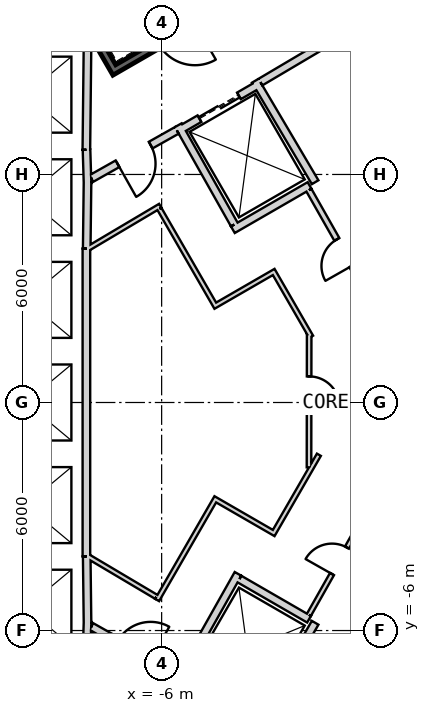
"""IFC4 building model, lengths in metres.
Left out: names, types, materials, properties, quantities, classifications, styles, units other than length and angle.
Written with IfcOpenShell. Run it as: python <this file> out.ifc"""

import sys

from ifc_helpers import new_model, si_unit, direction, frame, frame_2d, origin, place, context, subcontext, project, spatial, rectangle, extrude, element, fill, save


model = new_model("IFC4")
c1 = context("Model", 3, precision=1e-05, world=origin(), true_north=direction((0.0, 1.0)))
c2 = subcontext(c1, "Body", "Model", "MODEL_VIEW")
j1 = project(units=[si_unit("LENGTHUNIT", "METRE"), si_unit("PLANEANGLEUNIT", "RADIAN")], contexts=[c1])
p1 = place(None, origin())
s1 = spatial("IfcSite", under=j1, at=p1, CompositionType="ELEMENT")
p2 = place(p1, origin())
s2 = spatial("IfcBuilding", under=s1, at=p2, CompositionType="ELEMENT")
p3 = place(p2, frame((0.0, 0.0, 253.2)))
s3 = spatial("IfcBuildingStorey", under=s2, at=p3, CompositionType="ELEMENT", Elevation=253.2)
p4 = place(p3, frame((19.475, 2.208, 0.0), z_axis=(0.0, 0.0, 1.0), x_axis=(-0.866028369851, 0.499994862586, 0.0)))
e1 = element("IfcWall", 1, at=p4, inside=s3, PredefinedType="SHEAR", context=c2, shape_type="SweptSolid", body=[
    extrude(rectangle(XDim=31.523, YDim=0.9, at=frame_2d((15.762, 0.0))), origin(), (0.0, 0.0, 1.0), 4.0),
])
p5 = place(p4, frame((7.062, 0.0, 0.0)))
e2 = element("IfcOpeningElement", 2, at=p5, cuts=e1, PredefinedType="OPENING", context=c2, shape_type="SweptSolid", body=[
    extrude(rectangle(XDim=1.2, YDim=2.4, at=frame_2d((0.6, 1.2))), frame((0.0, 0.46, 0.0), z_axis=(0.0, -1.0, 0.0), x_axis=(1.0, 0.0, 0.0)), (0.0, 0.0, 1.0), 0.92),
])
p6 = place(p4, frame((3.612, 0.0, 0.0)))
e3 = element("IfcOpeningElement", 3, at=p6, cuts=e1, PredefinedType="OPENING", context=c2, shape_type="SweptSolid", body=[
    extrude(rectangle(XDim=1.2, YDim=2.4, at=frame_2d((0.6, 1.2))), frame((0.0, 0.46, 0.0), z_axis=(0.0, -1.0, 0.0), x_axis=(1.0, 0.0, 0.0)), (0.0, 0.0, 1.0), 0.92),
])
p7 = place(p4, frame((26.712, 0.0, 0.0)))
e4 = element("IfcOpeningElement", 4, at=p7, cuts=e1, PredefinedType="OPENING", context=c2, shape_type="SweptSolid", body=[
    extrude(rectangle(XDim=1.2, YDim=2.4, at=frame_2d((0.6, 1.2))), frame((0.0, 0.46, 0.0), z_axis=(0.0, -1.0, 0.0), x_axis=(1.0, 0.0, 0.0)), (0.0, 0.0, 1.0), 0.92),
])
p8 = place(p3, frame((-7.825, -17.97, 0.0), z_axis=(0.0, 0.0, 1.0), x_axis=(0.866028369851, 0.499994862586, 0.0)))
e5 = element("IfcWall", 5, at=p8, inside=s3, PredefinedType="SHEAR", context=c2, shape_type="SweptSolid", body=[
    extrude(rectangle(XDim=31.523, YDim=0.9, at=frame_2d((15.762, 0.0))), origin(), (0.0, 0.0, 1.0), 4.0),
])
p9 = place(p8, frame((7.062, 0.0, 0.0)))
e6 = element("IfcOpeningElement", 6, at=p9, cuts=e5, PredefinedType="OPENING", context=c2, shape_type="SweptSolid", body=[
    extrude(rectangle(XDim=1.2, YDim=2.4, at=frame_2d((0.6, 1.2))), frame((0.0, 0.46, 0.0), z_axis=(0.0, -1.0, 0.0), x_axis=(1.0, 0.0, 0.0)), (0.0, 0.0, 1.0), 0.92),
])
p10 = place(p8, frame((9.762, 0.0, 0.0)))
e7 = element("IfcOpeningElement", 7, at=p10, cuts=e5, PredefinedType="OPENING", context=c2, shape_type="SweptSolid", body=[
    extrude(rectangle(XDim=1.2, YDim=2.4, at=frame_2d((0.6, 1.2))), frame((0.0, 0.46, 0.0), z_axis=(0.0, -1.0, 0.0), x_axis=(1.0, 0.0, 0.0)), (0.0, 0.0, 1.0), 0.92),
])
p11 = place(p8, frame((12.462, 0.0, 0.0)))
e8 = element("IfcOpeningElement", 8, at=p11, cuts=e5, PredefinedType="OPENING", context=c2, shape_type="SweptSolid", body=[
    extrude(rectangle(XDim=1.2, YDim=2.4, at=frame_2d((0.6, 1.2))), frame((0.0, 0.46, 0.0), z_axis=(0.0, -1.0, 0.0), x_axis=(1.0, 0.0, 0.0)), (0.0, 0.0, 1.0), 0.92),
])
p12 = place(p8, frame((15.162, 0.0, 0.0)))
e9 = element("IfcOpeningElement", 9, at=p12, cuts=e5, PredefinedType="OPENING", context=c2, shape_type="SweptSolid", body=[
    extrude(rectangle(XDim=1.2, YDim=2.4, at=frame_2d((0.6, 1.2))), frame((0.0, 0.46, 0.0), z_axis=(0.0, -1.0, 0.0), x_axis=(1.0, 0.0, 0.0)), (0.0, 0.0, 1.0), 0.92),
])
p13 = place(p8, frame((17.862, 0.0, 0.0)))
e10 = element("IfcOpeningElement", 10, at=p13, cuts=e5, PredefinedType="OPENING", context=c2, shape_type="SweptSolid", body=[
    extrude(rectangle(XDim=1.2, YDim=2.4, at=frame_2d((0.6, 1.2))), frame((0.0, 0.46, 0.0), z_axis=(0.0, -1.0, 0.0), x_axis=(1.0, 0.0, 0.0)), (0.0, 0.0, 1.0), 0.92),
])
p14 = place(p8, frame((20.562, 0.0, 0.0)))
e11 = element("IfcOpeningElement", 11, at=p14, cuts=e5, PredefinedType="OPENING", context=c2, shape_type="SweptSolid", body=[
    extrude(rectangle(XDim=1.2, YDim=2.4, at=frame_2d((0.6, 1.2))), frame((0.0, 0.46, 0.0), z_axis=(0.0, -1.0, 0.0), x_axis=(1.0, 0.0, 0.0)), (0.0, 0.0, 1.0), 0.92),
])
p15 = place(p8, frame((26.712, 0.0, 0.0)))
e12 = element("IfcOpeningElement", 12, at=p15, cuts=e5, PredefinedType="OPENING", context=c2, shape_type="SweptSolid", body=[
    extrude(rectangle(XDim=1.2, YDim=2.4, at=frame_2d((0.6, 1.2))), frame((0.0, 0.46, 0.0), z_axis=(0.0, -1.0, 0.0), x_axis=(1.0, 0.0, 0.0)), (0.0, 0.0, 1.0), 0.92),
])
p16 = place(p8, frame((3.612, 0.0, 0.0)))
e13 = element("IfcOpeningElement", 13, at=p16, cuts=e5, PredefinedType="OPENING", context=c2, shape_type="SweptSolid", body=[
    extrude(rectangle(XDim=1.2, YDim=2.4, at=frame_2d((0.6, 1.2))), frame((0.0, 0.46, 0.0), z_axis=(0.0, -1.0, 0.0), x_axis=(1.0, 0.0, 0.0)), (0.0, 0.0, 1.0), 0.92),
])
p17 = place(p3, frame((-7.951, 9.35, 0.0), z_axis=(0.0, 0.0, 1.0), x_axis=(-0.011120469654, -0.999938165666, 0.0)))
e14 = element("IfcWall", 14, at=p17, inside=s3, PredefinedType="PLUMBINGWALL", context=c2, shape_type="SweptSolid", body=[
    extrude(rectangle(XDim=2.7, YDim=0.2, at=frame_2d((1.35, 0.0))), origin(), (0.0, 0.0, 1.0), 3.7),
])
p18 = place(p3, frame((-7.977, 6.65, 0.0), z_axis=(0.0, 0.0, 1.0), x_axis=(0.030861509705, -0.999523670164, 0.0)))
e15 = element("IfcWall", 15, at=p18, inside=s3, PredefinedType="PLUMBINGWALL", context=c2, shape_type="SweptSolid", body=[
    extrude(rectangle(XDim=0.878, YDim=0.2, at=frame_2d((0.439, 0.0))), origin(), (0.0, 0.0, 1.0), 3.7),
])
p19 = place(p3, frame((-7.949, 5.895, 0.0), z_axis=(0.0, 0.0, 1.0), x_axis=(-0.012042535896, -0.999927486035, 0.0)))
e16 = element("IfcWall", 16, at=p19, inside=s3, PredefinedType="PLUMBINGWALL", context=c2, shape_type="SweptSolid", body=[
    extrude(rectangle(XDim=1.845, YDim=0.2, at=frame_2d((0.922, 0.0))), origin(), (0.0, 0.0, 1.0), 3.7),
])
p20 = place(p3, frame((-7.98, 4.05, 0.0), z_axis=(0.0, 0.0, 1.0), x_axis=(0.0, -1.0, 0.0)))
e17 = element("IfcWall", 17, at=p20, inside=s3, PredefinedType="PLUMBINGWALL", context=c2, shape_type="SweptSolid", body=[
    extrude(rectangle(XDim=8.1, YDim=0.2, at=frame_2d((4.05, 0.0))), origin(), (0.0, 0.0, 1.0), 3.7),
])
p21 = place(p3, frame((-7.95, -5.772, 0.0), z_axis=(0.0, 0.0, 1.0), x_axis=(-0.030803413295, -0.999525462272, 0.0)))
e18 = element("IfcWall", 18, at=p21, inside=s3, PredefinedType="PLUMBINGWALL", context=c2, shape_type="SweptSolid", body=[
    extrude(rectangle(XDim=1.078, YDim=0.2, at=frame_2d((0.539, 0.0))), origin(), (0.0, 0.0, 1.0), 3.7),
])
p22 = place(p3, frame((-7.971, -4.05, 0.0), z_axis=(0.0, 0.0, 1.0), x_axis=(0.012042535896, -0.999927486035, 0.0)))
e19 = element("IfcWall", 19, at=p22, inside=s3, PredefinedType="PLUMBINGWALL", context=c2, shape_type="SweptSolid", body=[
    extrude(rectangle(XDim=1.845, YDim=0.2, at=frame_2d((0.922, 0.0))), origin(), (0.0, 0.0, 1.0), 3.7),
])
p23 = place(p3, frame((-11.245, 15.678, -0.3), z_axis=(0.0, 0.0, 1.0), x_axis=(0.499977274689, -0.866038523851, 0.0)))
e20 = element("IfcWall", 20, at=p23, inside=s3, PredefinedType="SHEAR", context=c2, shape_type="SweptSolid", body=[
    extrude(rectangle(XDim=8.1, YDim=0.2, at=frame_2d((4.05, 0.0))), origin(), (0.0, 0.0, 1.0), 4.0),
])
p24 = place(p3, frame((-7.159, 8.8, -0.3), z_axis=(0.0, 0.0, 1.0), x_axis=(0.866047807691, 0.499961193289, 0.0)))
e21 = element("IfcWall", 21, at=p24, inside=s3, PredefinedType="SHEAR", context=c2, shape_type="SweptSolid", body=[
    extrude(rectangle(XDim=3.6, YDim=0.2, at=frame_2d((1.8, 0.0))), origin(), (0.0, 0.0, 1.0), 4.0),
])
p25 = place(p24, frame((1.25, 0.0, 0.3)))
e22 = element("IfcOpeningElement", 22, at=p25, cuts=e21, PredefinedType="OPENING", context=c2, shape_type="SweptSolid", body=[
    extrude(rectangle(XDim=1.1, YDim=2.1, at=frame_2d((0.55, 1.05))), frame((0.0, 0.11, 0.0), z_axis=(0.0, -1.0, 0.0), x_axis=(1.0, 0.0, 0.0)), (0.0, 0.0, 1.0), 0.22),
])
p26 = place(p3, frame((-5.524, 7.168, 0.0), z_axis=(0.0, 0.0, 1.0), x_axis=(0.866024647952, 0.500001309137, 0.0)))
e23 = element("IfcWall", 23, at=p26, inside=s3, PredefinedType="PLUMBINGWALL", context=c2, shape_type="SweptSolid", body=[
    extrude(rectangle(XDim=2.4, YDim=0.2, at=frame_2d((1.2, 0.0))), origin(), (0.0, 0.0, 1.0), 3.7),
])
p27 = place(p26, frame((0.6, 0.0, 0.0)))
e24 = element("IfcOpeningElement", 24, at=p27, cuts=e23, PredefinedType="OPENING", context=c2, shape_type="SweptSolid", body=[
    extrude(rectangle(XDim=1.2, YDim=2.4, at=frame_2d((0.6, 1.2))), frame((0.0, 0.11, 0.0), z_axis=(0.0, -1.0, 0.0), x_axis=(1.0, 0.0, 0.0)), (0.0, 0.0, 1.0), 0.22),
])
p28 = place(p3, frame((-3.538, 8.465, 0.0), z_axis=(0.0, 0.0, 1.0), x_axis=(0.508647062354, -0.860975125052, 0.0)))
e25 = element("IfcWall", 25, at=p28, inside=s3, PredefinedType="PLUMBINGWALL", context=c2, shape_type="SweptSolid", body=[
    extrude(rectangle(XDim=3.1, YDim=0.2, at=frame_2d((1.55, 0.0))), origin(), (0.0, 0.0, 1.0), 3.7),
])
p29 = place(p3, frame((-2.108, 5.711, 0.0), z_axis=(0.0, 0.0, 1.0), x_axis=(-0.866009305107, -0.50002788269, 0.0)))
e26 = element("IfcWall", 26, at=p29, inside=s3, PredefinedType="PLUMBINGWALL", context=c2, shape_type="SweptSolid", body=[
    extrude(rectangle(XDim=2.329, YDim=0.2, at=frame_2d((1.165, 0.0))), origin(), (0.0, 0.0, 1.0), 3.7),
])
p30 = place(p3, frame((-5.562, 7.296, 0.0), z_axis=(0.0, 0.0, 1.0), x_axis=(0.49134651263, -0.870964180966, 0.0)))
e27 = element("IfcWall", 27, at=p30, inside=s3, PredefinedType="PLUMBINGWALL", context=c2, shape_type="SweptSolid", body=[
    extrude(rectangle(XDim=3.0, YDim=0.2, at=frame_2d((1.5, 0.0))), origin(), (0.0, 0.0, 1.0), 3.7),
])
p31 = place(p3, frame((-1.961, -5.796, 0.0), z_axis=(0.0, 0.0, 1.0), x_axis=(-0.500074377092, -0.865982457891, 0.0)))
e28 = element("IfcWall", 28, at=p31, inside=s3, PredefinedType="PLUMBINGWALL", context=c2, shape_type="SweptSolid", body=[
    extrude(rectangle(XDim=1.161, YDim=0.2, at=frame_2d((0.581, 0.0))), origin(), (0.0, 0.0, 1.0), 3.7),
])
p32 = place(p3, frame((-3.99, -4.509, 0.0), z_axis=(0.0, 0.0, 1.0), x_axis=(-0.491358283181, -0.870957540612, 0.0)))
e29 = element("IfcWall", 29, at=p32, inside=s3, PredefinedType="PLUMBINGWALL", context=c2, shape_type="SweptSolid", body=[
    extrude(rectangle(XDim=3.2, YDim=0.2, at=frame_2d((1.6, 0.0))), origin(), (0.0, 0.0, 1.0), 3.7),
])
p33 = place(p3, frame((-3.953, -4.646, 0.0), z_axis=(0.0, 0.0, 1.0), x_axis=(0.866060616833, -0.499939004251, 0.0)))
e30 = element("IfcWall", 30, at=p33, inside=s3, PredefinedType="PLUMBINGWALL", context=c2, shape_type="SweptSolid", body=[
    extrude(rectangle(XDim=2.115, YDim=0.2, at=frame_2d((1.057, 0.0))), origin(), (0.0, 0.0, 1.0), 3.7),
])
p34 = place(p3, frame((-1.056, 9.818, 0.0), z_axis=(0.0, 0.0, 1.0), x_axis=(-0.860599924646, -0.509281621207, 0.0)))
e31 = element("IfcWall", 31, at=p34, inside=s3, PredefinedType="PARTITIONING", context=c2, shape_type="SweptSolid", body=[
    extrude(rectangle(XDim=2.725, YDim=0.2, at=frame_2d((1.362, 0.0))), origin(), (0.0, 0.0, 1.0), 3.7),
])
p35 = place(p3, frame((-5.6, 7.16, 0.0), z_axis=(0.0, 0.0, 1.0), x_axis=(-0.871363259478, -0.490638431059, 0.0)))
e32 = element("IfcWall", 32, at=p35, inside=s3, PredefinedType="PARTITIONING", context=c2, shape_type="SweptSolid", body=[
    extrude(rectangle(XDim=2.581, YDim=0.2, at=frame_2d((1.291, 0.0))), origin(), (0.0, 0.0, 1.0), 3.7),
])
p36 = place(p35, frame((0.791, 0.0, 0.0)))
e33 = element("IfcOpeningElement", 33, at=p36, cuts=e32, PredefinedType="OPENING", context=c2, shape_type="SweptSolid", body=[
    extrude(rectangle(XDim=1.0, YDim=2.1, at=frame_2d((0.5, 1.05))), frame((0.0, 0.11, 0.0), z_axis=(0.0, -1.0, 0.0), x_axis=(1.0, 0.0, 0.0)), (0.0, 0.0, 1.0), 0.22),
])
p37 = place(p3, frame((-7.849, -5.894, 0.0), z_axis=(0.0, 0.0, 1.0), x_axis=(0.871363259478, -0.490638431059, 0.0)))
e34 = element("IfcWall", 34, at=p37, inside=s3, PredefinedType="PARTITIONING", context=c2, shape_type="SweptSolid", body=[
    extrude(rectangle(XDim=2.581, YDim=0.2, at=frame_2d((1.291, 0.0))), origin(), (0.0, 0.0, 1.0), 3.7),
])
p38 = place(p37, frame((0.791, 0.0, 0.0)))
e35 = element("IfcOpeningElement", 35, at=p38, cuts=e34, PredefinedType="OPENING", context=c2, shape_type="SweptSolid", body=[
    extrude(rectangle(XDim=1.0, YDim=2.1, at=frame_2d((0.5, 1.05))), frame((0.0, 0.11, 0.0), z_axis=(0.0, -1.0, 0.0), x_axis=(1.0, 0.0, 0.0)), (0.0, 0.0, 1.0), 0.22),
])
p39 = place(p3, frame((-2.124, 5.586, 0.0), z_axis=(0.0, 0.0, 1.0), x_axis=(0.493408695398, -0.869797596746, 0.0)))
e36 = element("IfcWall", 36, at=p39, inside=s3, PredefinedType="PLUMBINGWALL", context=c2, shape_type="SweptSolid", body=[
    extrude(rectangle(XDim=3.778, YDim=0.15, at=frame_2d((1.889, 0.0))), origin(), (0.0, 0.0, 1.0), 3.7),
])
p40 = place(p39, frame((1.489, 0.0, 0.0)))
e37 = element("IfcOpeningElement", 37, at=p40, cuts=e36, PredefinedType="OPENING", context=c2, shape_type="SweptSolid", body=[
    extrude(rectangle(XDim=0.8, YDim=2.1, at=frame_2d((0.4, 1.05))), frame((0.0, 0.085, 0.0), z_axis=(0.0, -1.0, 0.0), x_axis=(1.0, 0.0, 0.0)), (0.0, 0.0, 1.0), 0.17),
])
p41 = place(p3, frame((7.5, -3.042, 0.0), z_axis=(0.0, 0.0, 1.0), x_axis=(-0.936345316301, -0.35108040196, 0.0)))
e38 = element("IfcWall", 38, at=p41, inside=s3, PredefinedType="PARTITIONING", context=c2, shape_type="SweptSolid", body=[
    extrude(rectangle(XDim=10.568, YDim=0.12, at=frame_2d((5.284, 0.0))), origin(), (0.0, 0.0, 1.0), 3.7),
])
p42 = place(p3, frame((-0.466, -2.655, 0.0), z_axis=(0.0, 0.0, 1.0), x_axis=(-0.49235580986, -0.870394023703, 0.0)))
e39 = element("IfcWall", 39, at=p42, inside=s3, PredefinedType="PARTITIONING", context=c2, shape_type="SweptSolid", body=[
    extrude(rectangle(XDim=3.368, YDim=0.12, at=frame_2d((1.684, 0.0))), origin(), (0.0, 0.0, 1.0), 3.7),
])
p43 = place(p42, frame((1.335, 0.0, 0.0)))
e40 = element("IfcOpeningElement", 40, at=p43, cuts=e39, PredefinedType="OPENING", context=c2, shape_type="SweptSolid", body=[
    extrude(rectangle(XDim=0.8, YDim=2.1, at=frame_2d((0.4, 1.05))), frame((0.0, 0.07, 0.0), z_axis=(0.0, -1.0, 0.0), x_axis=(1.0, 0.0, 0.0)), (0.0, 0.0, 1.0), 0.14),
])
p44 = place(p3, frame((-6.037, 5.176, 0.0), z_axis=(0.0, 0.0, 1.0), x_axis=(-0.860106072674, -0.510115225953, 0.0)))
e41 = element("IfcWall", 41, at=p44, inside=s3, PredefinedType="PARTITIONING", context=c2, shape_type="SweptSolid", body=[
    extrude(rectangle(XDim=2.225, YDim=0.12, at=frame_2d((1.112, 0.0))), origin(), (0.0, 0.0, 1.0), 3.7),
])
p45 = place(p3, frame((-4.558, 2.495, 0.0), z_axis=(0.0, 0.0, 1.0), x_axis=(-0.499990139034, 0.866031096941, 0.0)))
e42 = element("IfcWall", 42, at=p45, inside=s3, PredefinedType="PARTITIONING", context=c2, shape_type="SweptSolid", body=[
    extrude(rectangle(XDim=3.0, YDim=0.12, at=frame_2d((1.5, 0.0))), origin(), (0.0, 0.0, 1.0), 3.7),
])
p46 = place(p3, frame((-2.999, 3.465, 0.0), z_axis=(0.0, 0.0, 1.0), x_axis=(-0.866059624469, -0.499940723351, 0.0)))
e43 = element("IfcWall", 43, at=p46, inside=s3, PredefinedType="PARTITIONING", context=c2, shape_type="SweptSolid", body=[
    extrude(rectangle(XDim=1.775, YDim=0.12, at=frame_2d((0.888, 0.0))), origin(), (0.0, 0.0, 1.0), 3.7),
])
p47 = place(p3, frame((-2.066, 1.729, 0.0), z_axis=(0.0, 0.0, 1.0), x_axis=(-0.500002807145, 0.866023783073, 0.0)))
e44 = element("IfcWall", 44, at=p47, inside=s3, PredefinedType="PARTITIONING", context=c2, shape_type="SweptSolid", body=[
    extrude(rectangle(XDim=1.91, YDim=0.12, at=frame_2d((0.955, 0.0))), origin(), (0.0, 0.0, 1.0), 3.7),
])
p48 = place(p3, frame((-2.122, -1.706, 0.0), z_axis=(0.0, 0.0, 1.0), x_axis=(0.001253480909, 0.999999214392, 0.0)))
e45 = element("IfcWall", 45, at=p48, inside=s3, PredefinedType="PARTITIONING", context=c2, shape_type="SweptSolid", body=[
    extrude(rectangle(XDim=3.506, YDim=0.12, at=frame_2d((1.753, 0.0))), origin(), (0.0, 0.0, 1.0), 3.7),
])
p49 = place(p48, frame((1.594, 0.0, 0.0)))
e46 = element("IfcOpeningElement", 46, at=p49, cuts=e45, PredefinedType="OPENING", context=c2, shape_type="SweptSolid", body=[
    extrude(rectangle(XDim=0.8, YDim=2.1, at=frame_2d((0.4, 1.05))), frame((0.0, 0.07, 0.0), z_axis=(0.0, -1.0, 0.0), x_axis=(1.0, 0.0, 0.0)), (0.0, 0.0, 1.0), 0.14),
])
p50 = place(p3, frame((-3.081, -3.487, 0.0), z_axis=(0.0, 0.0, 1.0), x_axis=(0.499962263673, 0.866047189767, 0.0)))
e47 = element("IfcWall", 47, at=p50, inside=s3, PredefinedType="PARTITIONING", context=c2, shape_type="SweptSolid", body=[
    extrude(rectangle(XDim=2.438, YDim=0.12, at=frame_2d((1.219, 0.0))), origin(), (0.0, 0.0, 1.0), 3.7),
])
p51 = place(p3, frame((-4.64, -2.517, 0.0), z_axis=(0.0, 0.0, 1.0), x_axis=(0.866025242659, -0.500000279077, 0.0)))
e48 = element("IfcWall", 48, at=p51, inside=s3, PredefinedType="PARTITIONING", context=c2, shape_type="SweptSolid", body=[
    extrude(rectangle(XDim=1.775, YDim=0.12, at=frame_2d((0.887, 0.0))), origin(), (0.0, 0.0, 1.0), 3.7),
])
p52 = place(p3, frame((-6.118, -5.197, 0.0), z_axis=(0.0, 0.0, 1.0), x_axis=(0.499990139034, 0.866031096941, 0.0)))
e49 = element("IfcWall", 49, at=p52, inside=s3, PredefinedType="PARTITIONING", context=c2, shape_type="SweptSolid", body=[
    extrude(rectangle(XDim=3.0, YDim=0.12, at=frame_2d((1.5, 0.0))), origin(), (0.0, 0.0, 1.0), 3.7),
])
p53 = place(p3, frame((-7.95, -4.041, 0.0), z_axis=(0.0, 0.0, 1.0), x_axis=(0.860112457103, -0.510104461004, 0.0)))
e50 = element("IfcWall", 50, at=p53, inside=s3, PredefinedType="PARTITIONING", context=c2, shape_type="SweptSolid", body=[
    extrude(rectangle(XDim=2.104, YDim=0.12, at=frame_2d((1.052, 0.0))), origin(), (0.0, 0.0, 1.0), 3.7),
])
p54 = place(p36, origin())
e51 = element("IfcDoor", 51, at=p54, inside=s3, OperationType="SINGLE_SWING_RIGHT", PredefinedType="USERDEFINED", context=c2, shape_type="SweptSolid", body=[
    extrude(rectangle(XDim=1.0, YDim=2.1, at=frame_2d((0.5, 1.05))), frame((0.0, 0.025, 0.0), z_axis=(0.0, -1.0, 0.0), x_axis=(1.0, 0.0, 0.0)), (0.0, 0.0, 1.0), 0.05),
])
fill(e33, e51)
p55 = place(p27, origin())
e52 = element("IfcDoor", 52, at=p55, inside=s3, OperationType="SLIDING_TO_LEFT", PredefinedType="USERDEFINED", context=c2, shape_type="SweptSolid", body=[
    extrude(rectangle(XDim=1.2, YDim=2.4, at=frame_2d((0.6, 1.2))), frame((0.0, 0.025, 0.0), z_axis=(0.0, -1.0, 0.0), x_axis=(1.0, 0.0, 0.0)), (0.0, 0.0, 1.0), 0.05),
])
fill(e24, e52)
p56 = place(p40, origin())
e53 = element("IfcDoor", 53, at=p56, inside=s3, OperationType="SINGLE_SWING_RIGHT", PredefinedType="USERDEFINED", context=c2, shape_type="SweptSolid", body=[
    extrude(rectangle(XDim=0.8, YDim=2.1, at=frame_2d((0.4, 1.05))), frame((0.0, 0.025, 0.0), z_axis=(0.0, -1.0, 0.0), x_axis=(1.0, 0.0, 0.0)), (0.0, 0.0, 1.0), 0.05),
])
fill(e37, e53)
p57 = place(p43, origin())
e54 = element("IfcDoor", 54, at=p57, inside=s3, OperationType="SINGLE_SWING_RIGHT", PredefinedType="USERDEFINED", context=c2, shape_type="SweptSolid", body=[
    extrude(rectangle(XDim=0.8, YDim=2.1, at=frame_2d((0.4, 1.05))), frame((0.0, 0.025, 0.0), z_axis=(0.0, -1.0, 0.0), x_axis=(1.0, 0.0, 0.0)), (0.0, 0.0, 1.0), 0.05),
])
fill(e40, e54)
p58 = place(p49, origin())
e55 = element("IfcDoor", 55, at=p58, inside=s3, OperationType="SINGLE_SWING_RIGHT", PredefinedType="USERDEFINED", context=c2, shape_type="SweptSolid", body=[
    extrude(rectangle(XDim=0.8, YDim=2.1, at=frame_2d((0.4, 1.05))), frame((0.0, 0.025, 0.0), z_axis=(0.0, -1.0, 0.0), x_axis=(1.0, 0.0, 0.0)), (0.0, 0.0, 1.0), 0.05),
])
fill(e46, e55)
save(model, sys.argv[1])
